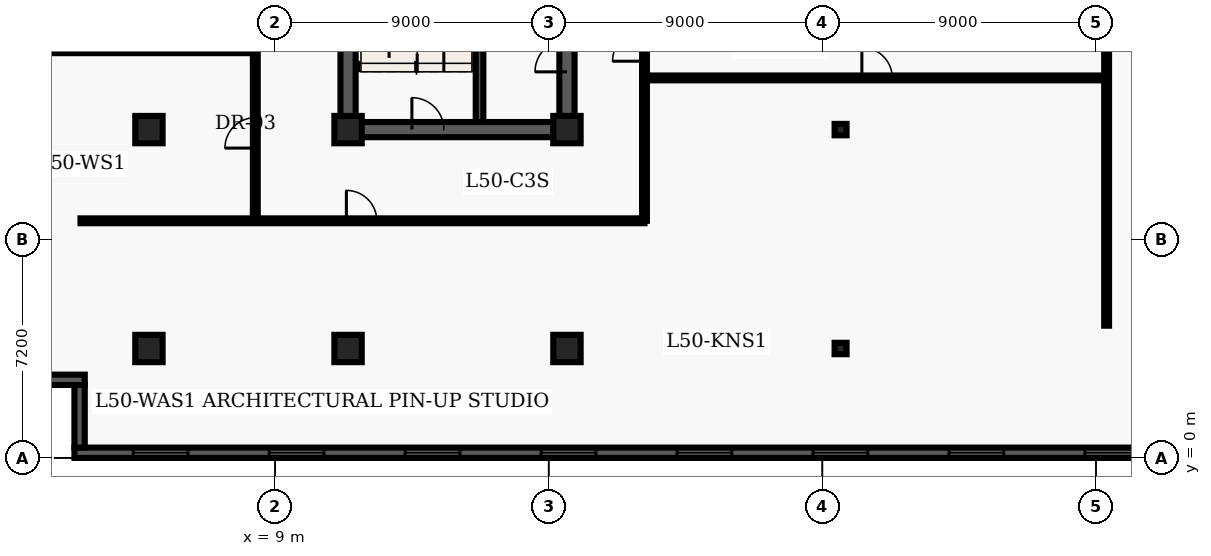
"""IFC4 building model, lengths in metres.
Left out: names, types, materials, properties, quantities, classifications, styles, units other than length and angle.
Written with IfcOpenShell. Run it as: python <this file> out.ifc"""

import sys

from ifc_helpers import new_model, entity, si_unit, converted_unit, direction, frame, origin_with_axes, origin_2d_with_axis, place, context, subcontext, project, spatial, polyline, rectangle, i_section, outline, extrude, element, fill, save


model = new_model("IFC4")
c1 = context("Model", 3, precision=1e-05, world=origin_with_axes(), true_north=direction((0.0, 1.0)))
c2 = subcontext(c1, "Body", "Model", "MODEL_VIEW")
j1 = project(units=[si_unit("LENGTHUNIT", "METRE"), converted_unit("PLANEANGLEUNIT", "DEGREE", entity("IfcPlaneAngleMeasure", 0.017), si_unit("PLANEANGLEUNIT", "RADIAN"), dimensions=[0, 0, 0, 0, 0, 0, 0])], contexts=[c1])
p1 = place(None, origin_with_axes())
s1 = spatial("IfcSite", under=j1, at=p1, CompositionType="ELEMENT")
p2 = place(p1, origin_with_axes())
s2 = spatial("IfcBuilding", under=s1, at=p2, CompositionType="ELEMENT")
p3 = place(p2, frame((0.0, 0.0, 204.3), z_axis=(0.0, 0.0, 1.0), x_axis=(1.0, 0.0, 0.0)))
s3 = spatial("IfcBuildingStorey", under=s2, at=p3, CompositionType="ELEMENT", Elevation=204.3)
p4 = place(p3, frame((11.4, 10.8, 0.0), z_axis=(0.0, 0.0, 1.0), x_axis=(0.0, 1.0, 0.0)))
e1 = element("IfcWall", 1, at=p4, inside=s3, PredefinedType="SHEAR", context=c2, shape_type="SweptSolid", body=[
    extrude(outline(polyline([(0.0, -0.25), (27.0, -0.25), (27.0, 0.25), (0.0, 0.25), (0.0, -0.25)])), origin_with_axes(), (0.0, 0.0, 1.0), 3.66),
])
p5 = place(p3, frame((11.4, 10.8, 0.0), z_axis=(0.0, 0.0, 1.0), x_axis=(1.0, 0.0, 0.0)))
e2 = element("IfcWall", 2, at=p5, inside=s3, PredefinedType="SHEAR", context=c2, shape_type="SweptSolid", body=[
    extrude(outline(polyline([(0.0, -0.25), (7.2, -0.25), (7.2, 0.25), (0.0, 0.25), (0.0, -0.25)])), origin_with_axes(), (0.0, 0.0, 1.0), 3.66),
])
p6 = place(p5, frame((2.625, 0.0, 0.0), z_axis=(0.0, 0.0, 1.0), x_axis=(1.0, 0.0, 0.0)))
e3 = element("IfcOpeningElement", 3, at=p6, cuts=e2, PredefinedType="OPENING", context=c2, shape_type="SweptSolid", body=[
    extrude(rectangle(XDim=1.05, YDim=0.52, at=origin_2d_with_axis()), origin_with_axes(), (0.0, 0.0, 1.0), 2.15),
])
p7 = place(p3, frame((18.6, 10.8, 0.0), z_axis=(0.0, 0.0, 1.0), x_axis=(0.0, 1.0, 0.0)))
e4 = element("IfcWall", 4, at=p7, inside=s3, PredefinedType="SHEAR", context=c2, shape_type="SweptSolid", body=[
    extrude(outline(polyline([(0.0, -0.25), (13.5, -0.25), (13.5, 0.25), (0.0, 0.25), (0.0, -0.25)])), origin_with_axes(), (0.0, 0.0, 1.0), 3.66),
])
p8 = place(p7, frame((11.125, 0.0, 0.0), z_axis=(0.0, 0.0, 1.0), x_axis=(1.0, 0.0, 0.0)))
e5 = element("IfcOpeningElement", 5, at=p8, cuts=e4, PredefinedType="OPENING", context=c2, shape_type="SweptSolid", body=[
    extrude(rectangle(XDim=1.05, YDim=0.52, at=origin_2d_with_axis()), origin_with_axes(), (0.0, 0.0, 1.0), 2.15),
])
p9 = place(p7, frame((2.425, 0.0, 0.0), z_axis=(0.0, 0.0, 1.0), x_axis=(1.0, 0.0, 0.0)))
e6 = element("IfcOpeningElement", 6, at=p9, cuts=e4, PredefinedType="OPENING", context=c2, shape_type="SweptSolid", body=[
    extrude(rectangle(XDim=1.05, YDim=0.52, at=origin_2d_with_axis()), origin_with_axes(), (0.0, 0.0, 1.0), 2.15),
])
p10 = place(p7, frame((6.725, 0.0, 0.0), z_axis=(0.0, 0.0, 1.0), x_axis=(1.0, 0.0, 0.0)))
e7 = element("IfcOpeningElement", 7, at=p10, cuts=e4, PredefinedType="OPENING", context=c2, shape_type="SweptSolid", body=[
    extrude(rectangle(XDim=1.05, YDim=0.52, at=origin_2d_with_axis()), origin_with_axes(), (0.0, 0.0, 1.0), 2.15),
])
p11 = place(p3, frame((15.725, 11.05, 0.0), z_axis=(0.0, 0.0, 1.0), x_axis=(0.0, 1.0, 0.0)))
e8 = element("IfcWall", 8, at=p11, inside=s3, PredefinedType="SHEAR", context=c2, shape_type="SweptSolid", body=[
    extrude(outline(polyline([(0.0, -0.125), (8.65, -0.125), (8.65, 0.125), (0.0, 0.125), (0.0, -0.125)])), origin_with_axes(), (0.0, 0.0, 1.0), 3.66),
])
for number, where, z_axis, x_axis in (
    (9, (11.4, 3.6, 0.0), (0.0, 0.0, 1.0), (1.0, 0.0, 0.0)),
    (10, (11.4, 10.8, 0.0), (0.0, 0.0, 1.0), (1.0, 0.0, 0.0)),
    (11, (18.6, 3.6, 0.0), (0.0, 0.0, 1.0), (1.0, 0.0, 0.0)),
    (12, (18.6, 10.8, 0.0), (0.0, 0.0, 1.0), (1.0, 0.0, 0.0)),
    (13, (4.85, 3.6, 0.0), (0.0, 0.0, 1.0), (1.0, 0.0, 0.0)),
    (14, (4.85, 10.8, 0.0), (0.0, 0.0, 1.0), (1.0, 0.0, 0.0)),
):
    element("IfcColumn", number, at=place(p3, frame(where, z_axis=z_axis, x_axis=x_axis)), inside=s3, PredefinedType="COLUMN", context=c2, shape_type="SweptSolid", body=[
        extrude(rectangle(XDim=0.9, YDim=0.9, at=origin_2d_with_axis()), origin_with_axes(), (0.0, 0.0, 1.0), 3.9),
    ])
for number, where, z_axis, x_axis in (
    (15, (27.6, 3.6, 0.0), (0.0, 0.0, 1.0), (1.0, 0.0, 0.0)),
    (16, (27.6, 10.8, 0.0), (0.0, 0.0, 1.0), (1.0, 0.0, 0.0)),
):
    element("IfcColumn", number, at=place(p3, frame(where, z_axis=z_axis, x_axis=x_axis)), inside=s3, PredefinedType="COLUMN", context=c2, shape_type="SweptSolid", body=[
        extrude(i_section(OverallWidth=0.394, OverallDepth=0.375, WebThickness=0.017, FlangeThickness=0.028, FilletRadius=0.02, at=origin_2d_with_axis()), origin_with_axes(), (0.0, 0.0, 1.0), 3.9),
    ])
p12 = place(p3, frame((2.6, 7.8, 0.0), z_axis=(0.0, 0.0, 1.0), x_axis=(1.0, 0.0, 0.0)))
e17 = element("IfcWall", 17, at=p12, inside=s3, PredefinedType="PARTITIONING", context=c2, shape_type="SweptSolid", body=[
    extrude(outline(polyline([(0.0, -0.08), (18.55, -0.08), (18.55, 0.08), (0.0, 0.08), (0.0, -0.08)])), origin_with_axes(), (0.0, 0.0, 1.0), 2.7),
])
p13 = place(p12, frame((9.245, 0.0, 0.0), z_axis=(0.0, 0.0, 1.0), x_axis=(1.0, 0.0, 0.0)))
e18 = element("IfcOpeningElement", 18, at=p13, cuts=e17, PredefinedType="OPENING", context=c2, shape_type="SweptSolid", body=[
    extrude(rectangle(XDim=1.0, YDim=0.18, at=origin_2d_with_axis()), origin_with_axes(), (0.0, 0.0, 1.0), 2.15),
])
p14 = place(p3, frame((21.15, 7.8, 0.0), z_axis=(0.0, 0.0, 1.0), x_axis=(0.0, 1.0, 0.0)))
e19 = element("IfcWall", 19, at=p14, inside=s3, PredefinedType="PARTITIONING", context=c2, shape_type="SweptSolid", body=[
    extrude(outline(polyline([(0.0, -0.08), (32.7, -0.08), (32.7, 0.08), (0.0, 0.08), (0.0, -0.08)])), origin_with_axes(), (0.0, 0.0, 1.0), 2.7),
])
p15 = place(p14, frame((16.227, 0.0, 0.0), z_axis=(0.0, 0.0, 1.0), x_axis=(1.0, 0.0, 0.0)))
e20 = element("IfcOpeningElement", 20, at=p15, cuts=e19, PredefinedType="OPENING", context=c2, shape_type="SweptSolid", body=[
    extrude(rectangle(XDim=1.0, YDim=0.18, at=origin_2d_with_axis()), origin_with_axes(), (0.0, 0.0, 1.0), 2.15),
])
p16 = place(p14, frame((20.01, 0.0, 0.0), z_axis=(0.0, 0.0, 1.0), x_axis=(1.0, 0.0, 0.0)))
e21 = element("IfcOpeningElement", 21, at=p16, cuts=e19, PredefinedType="OPENING", context=c2, shape_type="SweptSolid", body=[
    extrude(rectangle(XDim=1.0, YDim=0.18, at=origin_2d_with_axis()), origin_with_axes(), (0.0, 0.0, 1.0), 2.15),
])
p17 = place(p14, frame((23.131, 0.0, 0.0), z_axis=(0.0, 0.0, 1.0), x_axis=(1.0, 0.0, 0.0)))
e22 = element("IfcOpeningElement", 22, at=p17, cuts=e19, PredefinedType="OPENING", context=c2, shape_type="SweptSolid", body=[
    extrude(rectangle(XDim=1.0, YDim=0.18, at=origin_2d_with_axis()), origin_with_axes(), (0.0, 0.0, 1.0), 2.15),
])
p18 = place(p14, frame((26.564, 0.0, 0.0), z_axis=(0.0, 0.0, 1.0), x_axis=(1.0, 0.0, 0.0)))
e23 = element("IfcOpeningElement", 23, at=p18, cuts=e19, PredefinedType="OPENING", context=c2, shape_type="SweptSolid", body=[
    extrude(rectangle(XDim=1.0, YDim=0.18, at=origin_2d_with_axis()), origin_with_axes(), (0.0, 0.0, 1.0), 2.15),
])
p19 = place(p14, frame((30.466, 0.0, 0.0), z_axis=(0.0, 0.0, 1.0), x_axis=(1.0, 0.0, 0.0)))
e24 = element("IfcOpeningElement", 24, at=p19, cuts=e19, PredefinedType="OPENING", context=c2, shape_type="SweptSolid", body=[
    extrude(rectangle(XDim=1.0, YDim=0.18, at=origin_2d_with_axis()), origin_with_axes(), (0.0, 0.0, 1.0), 2.15),
])
p20 = place(p14, frame((5.775, 0.0, 0.0), z_axis=(0.0, 0.0, 1.0), x_axis=(1.0, 0.0, 0.0)))
e25 = element("IfcOpeningElement", 25, at=p20, cuts=e19, PredefinedType="OPENING", context=c2, shape_type="SweptSolid", body=[
    extrude(rectangle(XDim=1.05, YDim=0.18, at=origin_2d_with_axis()), origin_with_axes(), (0.0, 0.0, 1.0), 2.15),
])
p21 = place(p3, frame((8.35, 7.8, 0.0), z_axis=(0.0, 0.0, 1.0), x_axis=(0.0, 1.0, 0.0)))
e26 = element("IfcWall", 26, at=p21, inside=s3, PredefinedType="PARTITIONING", context=c2, shape_type="SweptSolid", body=[
    extrude(outline(polyline([(0.0, -0.08), (12.6, -0.08), (12.6, 0.08), (0.0, 0.08), (0.0, -0.08)])), origin_with_axes(), (0.0, 0.0, 1.0), 2.7),
])
p22 = place(p21, frame((2.893, 0.0, 0.0), z_axis=(0.0, 0.0, 1.0), x_axis=(1.0, 0.0, 0.0)))
e27 = element("IfcOpeningElement", 27, at=p22, cuts=e26, PredefinedType="OPENING", context=c2, shape_type="SweptSolid", body=[
    extrude(rectangle(XDim=1.0, YDim=0.18, at=origin_2d_with_axis()), origin_with_axes(), (0.0, 0.0, 1.0), 2.15),
])
p23 = place(p21, frame((9.088, 0.0, 0.0), z_axis=(0.0, 0.0, 1.0), x_axis=(1.0, 0.0, 0.0)))
e28 = element("IfcOpeningElement", 28, at=p23, cuts=e26, PredefinedType="OPENING", context=c2, shape_type="SweptSolid", body=[
    extrude(rectangle(XDim=1.0, YDim=0.18, at=origin_2d_with_axis()), origin_with_axes(), (0.0, 0.0, 1.0), 2.15),
])
p24 = place(p3, frame((0.335, 13.455, 0.0), z_axis=(0.0, 0.0, 1.0), x_axis=(1.0, 0.0, 0.0)))
e29 = element("IfcWall", 29, at=p24, inside=s3, PredefinedType="PARTITIONING", context=c2, shape_type="SweptSolid", body=[
    extrude(outline(polyline([(0.0, -0.14), (7.895, -0.14), (7.895, 0.14), (0.0, 0.14), (0.0, -0.14)])), origin_with_axes(), (0.0, 0.0, 1.0), 2.7),
])
p25 = place(p3, frame((21.15, 12.5, 0.0), z_axis=(0.0, 0.0, 1.0), x_axis=(1.0, 0.0, 0.0)))
e30 = element("IfcWall", 30, at=p25, inside=s3, PredefinedType="PARTITIONING", context=c2, shape_type="SweptSolid", body=[
    extrude(outline(polyline([(0.0, -0.08), (15.2, -0.08), (15.2, 0.08), (0.0, 0.08), (0.0, -0.08)])), origin_with_axes(), (0.0, 0.0, 1.0), 2.7),
])
p26 = place(p25, frame((7.65, 0.0, 0.0), z_axis=(0.0, 0.0, 1.0), x_axis=(1.0, 0.0, 0.0)))
e31 = element("IfcOpeningElement", 31, at=p26, cuts=e30, PredefinedType="OPENING", context=c2, shape_type="SweptSolid", body=[
    extrude(rectangle(XDim=1.0, YDim=0.18, at=origin_2d_with_axis()), origin_with_axes(), (0.0, 0.0, 1.0), 2.15),
])
p27 = place(p3, frame((36.35, 4.35, 0.0), z_axis=(0.0, 0.0, 1.0), x_axis=(0.0, 1.0, 0.0)))
e32 = element("IfcWall", 32, at=p27, inside=s3, PredefinedType="PARTITIONING", context=c2, shape_type="SweptSolid", body=[
    extrude(outline(polyline([(0.0, -0.08), (16.95, -0.08), (16.95, 0.08), (0.0, 0.08), (0.0, -0.08)])), origin_with_axes(), (0.0, 0.0, 1.0), 2.7),
])
p28 = place(p3, frame((57.26, 0.17, 0.0), z_axis=(0.0, 0.0, 1.0), x_axis=(-1.0, 0.0, 0.0)))
e33 = element("IfcWall", 33, at=p28, inside=s3, PredefinedType="SOLIDWALL", context=c2, shape_type="SweptSolid", body=[
    extrude(outline(polyline([(0.0, -0.17), (54.86, -0.17), (54.86, 0.17), (0.0, 0.17), (0.0, -0.17)])), origin_with_axes(), (0.0, 0.0, 1.0), 3.66),
])
p29 = place(p28, frame((2.836, 0.0, 0.45), z_axis=(0.0, 0.0, 1.0), x_axis=(1.0, 0.0, 0.0)))
e34 = element("IfcOpeningElement", 34, at=p29, cuts=e33, PredefinedType="OPENING", context=c2, shape_type="SweptSolid", body=[
    extrude(rectangle(XDim=1.8, YDim=0.36, at=origin_2d_with_axis()), origin_with_axes(), (0.0, 0.0, 1.0), 2.1),
])
p30 = place(p28, frame((7.307, 0.0, 0.45), z_axis=(0.0, 0.0, 1.0), x_axis=(1.0, 0.0, 0.0)))
e35 = element("IfcOpeningElement", 35, at=p30, cuts=e33, PredefinedType="OPENING", context=c2, shape_type="SweptSolid", body=[
    extrude(rectangle(XDim=1.8, YDim=0.36, at=origin_2d_with_axis()), origin_with_axes(), (0.0, 0.0, 1.0), 2.1),
])
p31 = place(p28, frame((11.779, 0.0, 0.45), z_axis=(0.0, 0.0, 1.0), x_axis=(1.0, 0.0, 0.0)))
e36 = element("IfcOpeningElement", 36, at=p31, cuts=e33, PredefinedType="OPENING", context=c2, shape_type="SweptSolid", body=[
    extrude(rectangle(XDim=1.8, YDim=0.36, at=origin_2d_with_axis()), origin_with_axes(), (0.0, 0.0, 1.0), 2.1),
])
p32 = place(p28, frame((16.251, 0.0, 0.45), z_axis=(0.0, 0.0, 1.0), x_axis=(1.0, 0.0, 0.0)))
e37 = element("IfcOpeningElement", 37, at=p32, cuts=e33, PredefinedType="OPENING", context=c2, shape_type="SweptSolid", body=[
    extrude(rectangle(XDim=1.8, YDim=0.36, at=origin_2d_with_axis()), origin_with_axes(), (0.0, 0.0, 1.0), 2.1),
])
p33 = place(p28, frame((20.723, 0.0, 0.45), z_axis=(0.0, 0.0, 1.0), x_axis=(1.0, 0.0, 0.0)))
e38 = element("IfcOpeningElement", 38, at=p33, cuts=e33, PredefinedType="OPENING", context=c2, shape_type="SweptSolid", body=[
    extrude(rectangle(XDim=1.8, YDim=0.36, at=origin_2d_with_axis()), origin_with_axes(), (0.0, 0.0, 1.0), 2.1),
])
p34 = place(p28, frame((25.194, 0.0, 0.45), z_axis=(0.0, 0.0, 1.0), x_axis=(1.0, 0.0, 0.0)))
e39 = element("IfcOpeningElement", 39, at=p34, cuts=e33, PredefinedType="OPENING", context=c2, shape_type="SweptSolid", body=[
    extrude(rectangle(XDim=1.8, YDim=0.36, at=origin_2d_with_axis()), origin_with_axes(), (0.0, 0.0, 1.0), 2.1),
])
p35 = place(p28, frame((29.666, 0.0, 0.45), z_axis=(0.0, 0.0, 1.0), x_axis=(1.0, 0.0, 0.0)))
e40 = element("IfcOpeningElement", 40, at=p35, cuts=e33, PredefinedType="OPENING", context=c2, shape_type="SweptSolid", body=[
    extrude(rectangle(XDim=1.8, YDim=0.36, at=origin_2d_with_axis()), origin_with_axes(), (0.0, 0.0, 1.0), 2.1),
])
p36 = place(p28, frame((34.138, 0.0, 0.45), z_axis=(0.0, 0.0, 1.0), x_axis=(1.0, 0.0, 0.0)))
e41 = element("IfcOpeningElement", 41, at=p36, cuts=e33, PredefinedType="OPENING", context=c2, shape_type="SweptSolid", body=[
    extrude(rectangle(XDim=1.8, YDim=0.36, at=origin_2d_with_axis()), origin_with_axes(), (0.0, 0.0, 1.0), 2.1),
])
p37 = place(p28, frame((38.609, 0.0, 0.45), z_axis=(0.0, 0.0, 1.0), x_axis=(1.0, 0.0, 0.0)))
e42 = element("IfcOpeningElement", 42, at=p37, cuts=e33, PredefinedType="OPENING", context=c2, shape_type="SweptSolid", body=[
    extrude(rectangle(XDim=1.8, YDim=0.36, at=origin_2d_with_axis()), origin_with_axes(), (0.0, 0.0, 1.0), 2.1),
])
p38 = place(p28, frame((43.081, 0.0, 0.45), z_axis=(0.0, 0.0, 1.0), x_axis=(1.0, 0.0, 0.0)))
e43 = element("IfcOpeningElement", 43, at=p38, cuts=e33, PredefinedType="OPENING", context=c2, shape_type="SweptSolid", body=[
    extrude(rectangle(XDim=1.8, YDim=0.36, at=origin_2d_with_axis()), origin_with_axes(), (0.0, 0.0, 1.0), 2.1),
])
p39 = place(p28, frame((47.553, 0.0, 0.45), z_axis=(0.0, 0.0, 1.0), x_axis=(1.0, 0.0, 0.0)))
e44 = element("IfcOpeningElement", 44, at=p39, cuts=e33, PredefinedType="OPENING", context=c2, shape_type="SweptSolid", body=[
    extrude(rectangle(XDim=1.8, YDim=0.36, at=origin_2d_with_axis()), origin_with_axes(), (0.0, 0.0, 1.0), 2.1),
])
p40 = place(p28, frame((52.024, 0.0, 0.45), z_axis=(0.0, 0.0, 1.0), x_axis=(1.0, 0.0, 0.0)))
e45 = element("IfcOpeningElement", 45, at=p40, cuts=e33, PredefinedType="OPENING", context=c2, shape_type="SweptSolid", body=[
    extrude(rectangle(XDim=1.8, YDim=0.36, at=origin_2d_with_axis()), origin_with_axes(), (0.0, 0.0, 1.0), 2.1),
])
p41 = place(p3, frame((2.57, 0.34, 0.0), z_axis=(0.0, 0.0, 1.0), x_axis=(0.0, 1.0, 0.0)))
e46 = element("IfcWall", 46, at=p41, inside=s3, PredefinedType="SOLIDWALL", context=c2, shape_type="SweptSolid", body=[
    extrude(outline(polyline([(0.0, -0.17), (2.06, -0.17), (2.06, 0.17), (0.0, 0.17), (0.0, -0.17)])), origin_with_axes(), (0.0, 0.0, 1.0), 3.66),
])
p42 = place(p3, frame((2.74, 2.57, 0.0), z_axis=(0.0, 0.0, 1.0), x_axis=(-1.0, 0.0, 0.0)))
e47 = element("IfcWall", 47, at=p42, inside=s3, PredefinedType="SOLIDWALL", context=c2, shape_type="SweptSolid", body=[
    extrude(outline(polyline([(0.0, -0.17), (2.74, -0.17), (2.74, 0.17), (0.0, 0.17), (0.0, -0.17)])), origin_with_axes(), (0.0, 0.0, 1.0), 3.66),
])
p43 = place(p5, frame((2.625, 0.0, 0.0), z_axis=(0.0, 0.0, 1.0), x_axis=(1.0, 0.0, 0.0)))
e48 = element("IfcDoor", 48, at=p43, inside=s3, OperationType="SINGLE_SWING_LEFT", PredefinedType="DOOR", context=c2, shape_type="SweptSolid", body=[
    extrude(rectangle(XDim=1.05, YDim=0.09, at=origin_2d_with_axis()), origin_with_axes(), (0.0, 0.0, 1.0), 2.15),
])
fill(e3, e48)
p44 = place(p7, frame((2.425, 0.0, 0.0), z_axis=(0.0, 0.0, 1.0), x_axis=(1.0, 0.0, 0.0)))
e49 = element("IfcDoor", 49, at=p44, inside=s3, OperationType="SINGLE_SWING_LEFT", PredefinedType="DOOR", context=c2, shape_type="SweptSolid", body=[
    extrude(rectangle(XDim=1.05, YDim=0.09, at=origin_2d_with_axis()), origin_with_axes(), (0.0, 0.0, 1.0), 2.15),
])
fill(e6, e49)
p45 = place(p21, frame((2.893, 0.0, 0.0), z_axis=(0.0, 0.0, 1.0), x_axis=(1.0, 0.0, 0.0)))
e50 = element("IfcDoor", 50, at=p45, inside=s3, OperationType="SINGLE_SWING_LEFT", PredefinedType="DOOR", context=c2, shape_type="SweptSolid", body=[
    extrude(rectangle(XDim=1.0, YDim=0.09, at=origin_2d_with_axis()), origin_with_axes(), (0.0, 0.0, 1.0), 2.15),
])
fill(e27, e50)
p46 = place(p12, frame((9.245, 0.0, 0.0), z_axis=(0.0, 0.0, 1.0), x_axis=(1.0, 0.0, 0.0)))
e51 = element("IfcDoor", 51, at=p46, inside=s3, OperationType="SINGLE_SWING_LEFT", PredefinedType="DOOR", context=c2, shape_type="SweptSolid", body=[
    extrude(rectangle(XDim=1.0, YDim=0.09, at=origin_2d_with_axis()), origin_with_axes(), (0.0, 0.0, 1.0), 2.15),
])
fill(e18, e51)
p47 = place(p14, frame((5.775, 0.0, 0.0), z_axis=(0.0, 0.0, 1.0), x_axis=(1.0, 0.0, 0.0)))
e52 = element("IfcDoor", 52, at=p47, inside=s3, OperationType="SINGLE_SWING_LEFT", PredefinedType="DOOR", context=c2, shape_type="SweptSolid", body=[
    extrude(rectangle(XDim=1.05, YDim=0.09, at=origin_2d_with_axis()), origin_with_axes(), (0.0, 0.0, 1.0), 2.15),
])
fill(e25, e52)
p48 = place(p25, frame((7.65, 0.0, 0.0), z_axis=(0.0, 0.0, 1.0), x_axis=(1.0, 0.0, 0.0)))
e53 = element("IfcDoor", 53, at=p48, inside=s3, OperationType="SINGLE_SWING_LEFT", PredefinedType="DOOR", context=c2, shape_type="SweptSolid", body=[
    extrude(rectangle(XDim=1.0, YDim=0.09, at=origin_2d_with_axis()), origin_with_axes(), (0.0, 0.0, 1.0), 2.15),
])
fill(e31, e53)
p49 = place(p28, frame((20.723, 0.0, 0.45), z_axis=(0.0, 0.0, 1.0), x_axis=(1.0, 0.0, 0.0)))
e54 = element("IfcWindow", 54, at=p49, inside=s3, PredefinedType="WINDOW", context=c2, shape_type="SweptSolid", body=[
    extrude(rectangle(XDim=1.8, YDim=0.09, at=origin_2d_with_axis()), origin_with_axes(), (0.0, 0.0, 1.0), 2.1),
])
fill(e38, e54)
p50 = place(p28, frame((25.194, 0.0, 0.45), z_axis=(0.0, 0.0, 1.0), x_axis=(1.0, 0.0, 0.0)))
e55 = element("IfcWindow", 55, at=p50, inside=s3, PredefinedType="WINDOW", context=c2, shape_type="SweptSolid", body=[
    extrude(rectangle(XDim=1.8, YDim=0.09, at=origin_2d_with_axis()), origin_with_axes(), (0.0, 0.0, 1.0), 2.1),
])
fill(e39, e55)
p51 = place(p28, frame((29.666, 0.0, 0.45), z_axis=(0.0, 0.0, 1.0), x_axis=(1.0, 0.0, 0.0)))
e56 = element("IfcWindow", 56, at=p51, inside=s3, PredefinedType="WINDOW", context=c2, shape_type="SweptSolid", body=[
    extrude(rectangle(XDim=1.8, YDim=0.09, at=origin_2d_with_axis()), origin_with_axes(), (0.0, 0.0, 1.0), 2.1),
])
fill(e40, e56)
p52 = place(p28, frame((34.138, 0.0, 0.45), z_axis=(0.0, 0.0, 1.0), x_axis=(1.0, 0.0, 0.0)))
e57 = element("IfcWindow", 57, at=p52, inside=s3, PredefinedType="WINDOW", context=c2, shape_type="SweptSolid", body=[
    extrude(rectangle(XDim=1.8, YDim=0.09, at=origin_2d_with_axis()), origin_with_axes(), (0.0, 0.0, 1.0), 2.1),
])
fill(e41, e57)
p53 = place(p28, frame((38.609, 0.0, 0.45), z_axis=(0.0, 0.0, 1.0), x_axis=(1.0, 0.0, 0.0)))
e58 = element("IfcWindow", 58, at=p53, inside=s3, PredefinedType="WINDOW", context=c2, shape_type="SweptSolid", body=[
    extrude(rectangle(XDim=1.8, YDim=0.09, at=origin_2d_with_axis()), origin_with_axes(), (0.0, 0.0, 1.0), 2.1),
])
fill(e42, e58)
p54 = place(p28, frame((43.081, 0.0, 0.45), z_axis=(0.0, 0.0, 1.0), x_axis=(1.0, 0.0, 0.0)))
e59 = element("IfcWindow", 59, at=p54, inside=s3, PredefinedType="WINDOW", context=c2, shape_type="SweptSolid", body=[
    extrude(rectangle(XDim=1.8, YDim=0.09, at=origin_2d_with_axis()), origin_with_axes(), (0.0, 0.0, 1.0), 2.1),
])
fill(e43, e59)
p55 = place(p28, frame((47.553, 0.0, 0.45), z_axis=(0.0, 0.0, 1.0), x_axis=(1.0, 0.0, 0.0)))
e60 = element("IfcWindow", 60, at=p55, inside=s3, PredefinedType="WINDOW", context=c2, shape_type="SweptSolid", body=[
    extrude(rectangle(XDim=1.8, YDim=0.09, at=origin_2d_with_axis()), origin_with_axes(), (0.0, 0.0, 1.0), 2.1),
])
fill(e44, e60)
p56 = place(p28, frame((52.024, 0.0, 0.45), z_axis=(0.0, 0.0, 1.0), x_axis=(1.0, 0.0, 0.0)))
e61 = element("IfcWindow", 61, at=p56, inside=s3, PredefinedType="WINDOW", context=c2, shape_type="SweptSolid", body=[
    extrude(rectangle(XDim=1.8, YDim=0.09, at=origin_2d_with_axis()), origin_with_axes(), (0.0, 0.0, 1.0), 2.1),
])
fill(e45, e61)
save(model, sys.argv[1])
